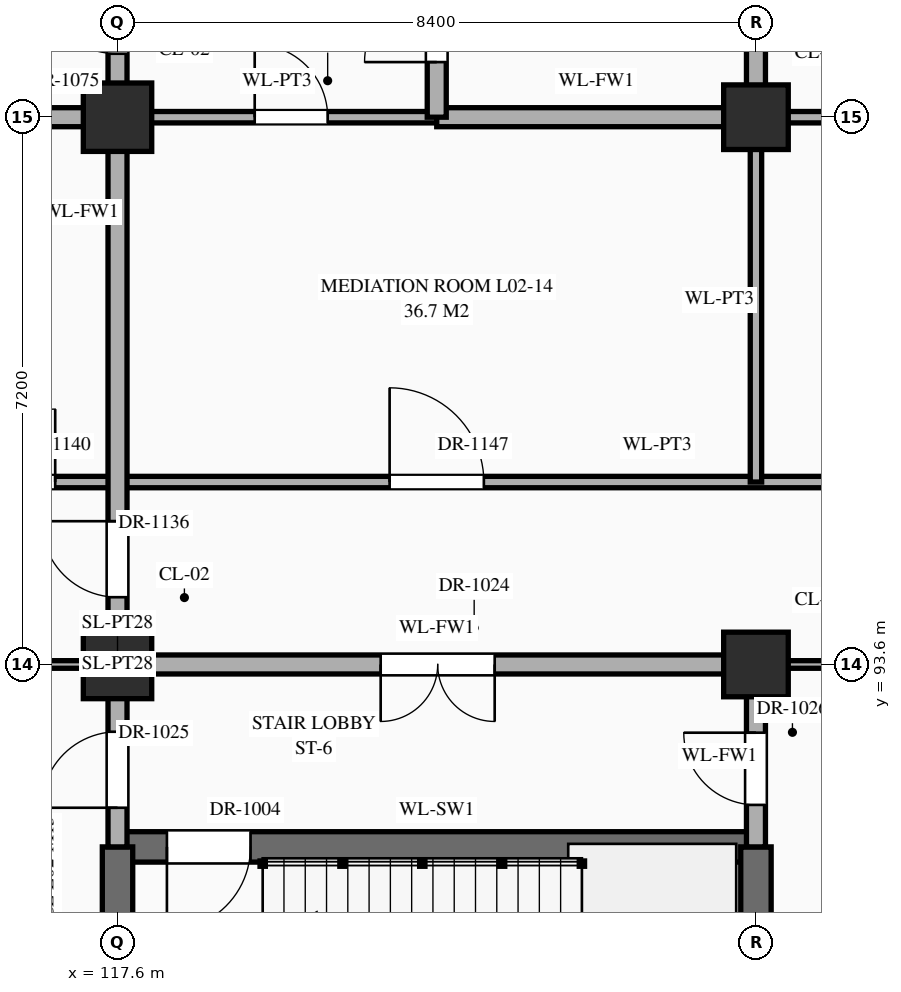
"""IFC4 building model, lengths in metres.
Left out: names, types, materials, properties, quantities, classifications, styles, units other than length and angle.
Written with IfcOpenShell. Run it as: python <this file> out.ifc"""

import sys

from ifc_helpers import new_model, si_unit, direction, frame, frame_2d, origin, origin_2d, place, context, subcontext, project, spatial, rectangle, extrude, element, fill, save


model = new_model("IFC4")
c1 = context("Model", 3, precision=1e-05, world=origin(), true_north=direction((0.0, 1.0)))
c2 = subcontext(c1, "Body", "Model", "MODEL_VIEW")
j1 = project(units=[si_unit("LENGTHUNIT", "METRE"), si_unit("PLANEANGLEUNIT", "RADIAN")], contexts=[c1])
p1 = place(None, origin())
s1 = spatial("IfcSite", under=j1, at=p1, CompositionType="ELEMENT")
p2 = place(p1, origin())
s2 = spatial("IfcBuilding", under=s1, at=p2, CompositionType="ELEMENT")
p3 = place(p2, frame((0.0, 0.0, 5.4)))
s3 = spatial("IfcBuildingStorey", under=s2, at=p3, CompositionType="ELEMENT", Elevation=5.4)
for number, where, z_axis, x_axis in (
    (1, (117.6, 93.6, 0.0), (0.0, 0.0, 1.0), (1.0, 0.0, 0.0)),
    (2, (117.6, 100.8, 0.0), (0.0, 0.0, 1.0), (1.0, 0.0, 0.0)),
):
    element("IfcColumn", number, at=place(p3, frame(where, z_axis=z_axis, x_axis=x_axis)), inside=s3, PredefinedType="COLUMN", context=c2, shape_type="SweptSolid", body=[
        extrude(rectangle(XDim=0.9, YDim=0.9, at=origin_2d()), origin(), (0.0, 0.0, 1.0), 5.4),
    ])
for number, where, z_axis, x_axis in (
    (3, (126.0, 93.6, 0.0), (0.0, 0.0, 1.0), (1.0, 0.0, 0.0)),
    (4, (126.0, 100.8, 0.0), (0.0, 0.0, 1.0), (1.0, 0.0, 0.0)),
):
    element("IfcColumn", number, at=place(p3, frame(where, z_axis=z_axis, x_axis=x_axis)), inside=s3, PredefinedType="COLUMN", context=c2, shape_type="SweptSolid", body=[
        extrude(rectangle(XDim=0.85, YDim=0.85, at=origin_2d()), origin(), (0.0, 0.0, 1.0), 5.4),
    ])
p4 = place(p3, frame((117.6, 91.2, 0.0), z_axis=(0.0, 0.0, 1.0), x_axis=(1.0, 0.0, 0.0)))
e5 = element("IfcWall", 5, at=p4, inside=s3, PredefinedType="SHEAR", context=c2, shape_type="SweptSolid", body=[
    extrude(rectangle(XDim=8.4, YDim=0.4, at=frame_2d((4.2, 0.0))), origin(), (0.0, 0.0, 1.0), 5.12),
])
p5 = place(p4, frame((0.65, 0.0, 0.0)))
e6 = element("IfcOpeningElement", 6, at=p5, cuts=e5, PredefinedType="OPENING", context=c2, shape_type="SweptSolid", body=[
    extrude(rectangle(XDim=1.1, YDim=2.2, at=frame_2d((0.55, 1.1))), frame((0.0, 0.212, 0.0), z_axis=(0.0, -1.0, 0.0), x_axis=(1.0, 0.0, 0.0)), (0.0, 0.0, 1.0), 0.424),
])
p6 = place(p3, frame((109.2, 93.6, 0.0), z_axis=(0.0, 0.0, 1.0), x_axis=(1.0, 0.0, 0.0)))
e7 = element("IfcWall", 7, at=p6, inside=s3, PredefinedType="STANDARD", context=c2, shape_type="SweptSolid", body=[
    extrude(rectangle(XDim=8.4, YDim=0.1, at=frame_2d((4.2, 0.0))), origin(), (0.0, 0.0, 1.0), 4.27),
])
p7 = place(p6, frame((1.025, 0.0, 0.0)))
e8 = element("IfcOpeningElement", 8, at=p7, cuts=e7, PredefinedType="OPENING", context=c2, shape_type="SweptSolid", body=[
    extrude(rectangle(XDim=1.12, YDim=2.25, at=frame_2d((0.56, 1.125))), frame((0.0, 0.062, 0.0), z_axis=(0.0, -1.0, 0.0), x_axis=(1.0, 0.0, 0.0)), (0.0, 0.0, 1.0), 0.124),
])
p8 = place(p6, frame((3.62, 0.0, 0.0)))
e9 = element("IfcOpeningElement", 9, at=p8, cuts=e7, PredefinedType="OPENING", context=c2, shape_type="SweptSolid", body=[
    extrude(rectangle(XDim=1.16, YDim=2.3, at=frame_2d((0.58, 1.15))), frame((0.0, 0.062, 0.0), z_axis=(0.0, -1.0, 0.0), x_axis=(1.0, 0.0, 0.0)), (0.0, 0.0, 1.0), 0.124),
])
p9 = place(p6, frame((6.215, 0.0, 0.0)))
e10 = element("IfcOpeningElement", 10, at=p9, cuts=e7, PredefinedType="OPENING", context=c2, shape_type="SweptSolid", body=[
    extrude(rectangle(XDim=1.2, YDim=2.35, at=frame_2d((0.6, 1.175))), frame((0.0, 0.062, 0.0), z_axis=(0.0, -1.0, 0.0), x_axis=(1.0, 0.0, 0.0)), (0.0, 0.0, 1.0), 0.124),
])
p10 = place(p3, frame((117.6, 93.6, 0.0), z_axis=(0.0, 0.0, 1.0), x_axis=(1.0, 0.0, 0.0)))
e11 = element("IfcWall", 11, at=p10, inside=s3, PredefinedType="STANDARD", context=c2, shape_type="SweptSolid", body=[
    extrude(rectangle(XDim=8.4, YDim=0.25, at=frame_2d((4.2, 0.0))), origin(), (0.0, 0.0, 1.0), 4.27),
])
p11 = place(p10, frame((3.462, 0.0, 0.0)))
e12 = element("IfcOpeningElement", 12, at=p11, cuts=e11, PredefinedType="OPENING", context=c2, shape_type="SweptSolid", body=[
    extrude(rectangle(XDim=1.5, YDim=2.25, at=frame_2d((0.75, 1.125))), frame((0.0, 0.137, 0.0), z_axis=(0.0, -1.0, 0.0), x_axis=(1.0, 0.0, 0.0)), (0.0, 0.0, 1.0), 0.274),
])
p12 = place(p3, frame((126.0, 93.6, 0.0), z_axis=(0.0, 0.0, 1.0), x_axis=(1.0, 0.0, 0.0)))
e13 = element("IfcWall", 13, at=p12, inside=s3, PredefinedType="STANDARD", context=c2, shape_type="SweptSolid", body=[
    extrude(rectangle(XDim=16.8, YDim=0.1, at=frame_2d((8.4, 0.0))), origin(), (0.0, 0.0, 1.0), 4.27),
])
p13 = place(p12, frame((3.72, 0.0, 0.0)))
e14 = element("IfcOpeningElement", 14, at=p13, cuts=e13, PredefinedType="OPENING", context=c2, shape_type="SweptSolid", body=[
    extrude(rectangle(XDim=0.96, YDim=2.2, at=frame_2d((0.48, 1.1))), frame((0.0, 0.062, 0.0), z_axis=(0.0, -1.0, 0.0), x_axis=(1.0, 0.0, 0.0)), (0.0, 0.0, 1.0), 0.124),
])
p14 = place(p12, frame((9.472, 0.0, 0.0)))
e15 = element("IfcOpeningElement", 15, at=p14, cuts=e13, PredefinedType="OPENING", context=c2, shape_type="SweptSolid", body=[
    extrude(rectangle(XDim=1.0, YDim=2.25, at=frame_2d((0.5, 1.125))), frame((0.0, 0.062, 0.0), z_axis=(0.0, -1.0, 0.0), x_axis=(1.0, 0.0, 0.0)), (0.0, 0.0, 1.0), 0.124),
])
p15 = place(p12, frame((11.75, 0.0, 0.0)))
e16 = element("IfcOpeningElement", 16, at=p15, cuts=e13, PredefinedType="OPENING", context=c2, shape_type="SweptSolid", body=[
    extrude(rectangle(XDim=1.7, YDim=2.45, at=frame_2d((0.85, 1.225))), frame((0.0, 0.062, 0.0), z_axis=(0.0, -1.0, 0.0), x_axis=(1.0, 0.0, 0.0)), (0.0, 0.0, 1.0), 0.124),
])
p16 = place(p12, frame((14.688, 0.0, 0.0)))
e17 = element("IfcOpeningElement", 17, at=p16, cuts=e13, PredefinedType="OPENING", context=c2, shape_type="SweptSolid", body=[
    extrude(rectangle(XDim=1.08, YDim=2.25, at=frame_2d((0.54, 1.125))), frame((0.0, 0.062, 0.0), z_axis=(0.0, -1.0, 0.0), x_axis=(1.0, 0.0, 0.0)), (0.0, 0.0, 1.0), 0.124),
])
p17 = place(p3, frame((115.0, 96.0, 0.0), z_axis=(0.0, 0.0, 1.0), x_axis=(1.0, 0.0, 0.0)))
e18 = element("IfcWall", 18, at=p17, inside=s3, PredefinedType="STANDARD", context=c2, shape_type="SweptSolid", body=[
    extrude(rectangle(XDim=19.4, YDim=0.15, at=frame_2d((9.7, 0.0))), origin(), (0.0, 0.0, 1.0), 5.12),
])
p18 = place(p17, frame((0.82, 0.0, 0.0)))
e19 = element("IfcOpeningElement", 19, at=p18, cuts=e18, PredefinedType="OPENING", context=c2, shape_type="SweptSolid", body=[
    extrude(rectangle(XDim=0.96, YDim=2.2, at=frame_2d((0.48, 1.1))), frame((0.0, 0.087, 0.0), z_axis=(0.0, -1.0, 0.0), x_axis=(1.0, 0.0, 0.0)), (0.0, 0.0, 1.0), 0.174),
])
p19 = place(p17, frame((6.18, 0.0, 0.0)))
e20 = element("IfcOpeningElement", 20, at=p19, cuts=e18, PredefinedType="OPENING", context=c2, shape_type="SweptSolid", body=[
    extrude(rectangle(XDim=1.24, YDim=2.3, at=frame_2d((0.62, 1.15))), frame((0.0, 0.087, 0.0), z_axis=(0.0, -1.0, 0.0), x_axis=(1.0, 0.0, 0.0)), (0.0, 0.0, 1.0), 0.174),
])
p20 = place(p17, frame((14.56, 0.0, 0.0)))
e21 = element("IfcOpeningElement", 21, at=p20, cuts=e18, PredefinedType="OPENING", context=c2, shape_type="SweptSolid", body=[
    extrude(rectangle(XDim=1.28, YDim=2.35, at=frame_2d((0.64, 1.175))), frame((0.0, 0.087, 0.0), z_axis=(0.0, -1.0, 0.0), x_axis=(1.0, 0.0, 0.0)), (0.0, 0.0, 1.0), 0.174),
])
p21 = place(p3, frame((113.4, 100.8, 0.0), z_axis=(0.0, 0.0, 1.0), x_axis=(1.0, 0.0, 0.0)))
e22 = element("IfcWall", 22, at=p21, inside=s3, PredefinedType="STANDARD", context=c2, shape_type="SweptSolid", body=[
    extrude(rectangle(XDim=4.2, YDim=0.25, at=frame_2d((2.1, 0.0))), origin(), (0.0, 0.0, 1.0), 4.27),
])
p22 = place(p21, frame((0.325, 0.0, 0.0)))
e23 = element("IfcOpeningElement", 23, at=p22, cuts=e22, PredefinedType="OPENING", context=c2, shape_type="SweptSolid", body=[
    extrude(rectangle(XDim=0.95, YDim=2.15, at=frame_2d((0.475, 1.075))), frame((0.0, 0.137, 0.0), z_axis=(0.0, -1.0, 0.0), x_axis=(1.0, 0.0, 0.0)), (0.0, 0.0, 1.0), 0.274),
])
p23 = place(p21, frame((2.165, 0.0, 0.0)))
e24 = element("IfcOpeningElement", 24, at=p23, cuts=e22, PredefinedType="OPENING", context=c2, shape_type="SweptSolid", body=[
    extrude(rectangle(XDim=1.1, YDim=2.2, at=frame_2d((0.55, 1.1))), frame((0.0, 0.137, 0.0), z_axis=(0.0, -1.0, 0.0), x_axis=(1.0, 0.0, 0.0)), (0.0, 0.0, 1.0), 0.274),
])
p24 = place(p3, frame((117.6, 100.8, 0.0), z_axis=(0.0, 0.0, 1.0), x_axis=(1.0, 0.0, 0.0)))
e25 = element("IfcWall", 25, at=p24, inside=s3, PredefinedType="STANDARD", context=c2, shape_type="SweptSolid", body=[
    extrude(rectangle(XDim=4.2, YDim=0.15, at=frame_2d((2.1, 0.0))), origin(), (0.0, 0.0, 1.0), 4.27),
])
p25 = place(p24, frame((1.805, 0.0, 0.0)))
e26 = element("IfcOpeningElement", 26, at=p25, cuts=e25, PredefinedType="OPENING", context=c2, shape_type="SweptSolid", body=[
    extrude(rectangle(XDim=0.96, YDim=2.2, at=frame_2d((0.48, 1.1))), frame((0.0, 0.087, 0.0), z_axis=(0.0, -1.0, 0.0), x_axis=(1.0, 0.0, 0.0)), (0.0, 0.0, 1.0), 0.174),
])
p26 = place(p3, frame((121.8, 100.8, 0.0), z_axis=(0.0, 0.0, 1.0), x_axis=(1.0, 0.0, 0.0)))
e27 = element("IfcWall", 27, at=p26, inside=s3, PredefinedType="STANDARD", context=c2, shape_type="SweptSolid", body=[
    extrude(rectangle(XDim=4.2, YDim=0.25, at=frame_2d((2.1, 0.0))), origin(), (0.0, 0.0, 1.0), 4.27),
])
p27 = place(p3, frame((126.0, 100.8, 0.0), z_axis=(0.0, 0.0, 1.0), x_axis=(1.0, 0.0, 0.0)))
e28 = element("IfcWall", 28, at=p27, inside=s3, PredefinedType="STANDARD", context=c2, shape_type="SweptSolid", body=[
    extrude(rectangle(XDim=8.4, YDim=0.15, at=frame_2d((4.2, 0.0))), origin(), (0.0, 0.0, 1.0), 4.27),
])
p28 = place(p27, frame((3.6, 0.0, 0.0)))
e29 = element("IfcOpeningElement", 29, at=p28, cuts=e28, PredefinedType="OPENING", context=c2, shape_type="SweptSolid", body=[
    extrude(rectangle(XDim=1.2, YDim=2.35, at=frame_2d((0.6, 1.175))), frame((0.0, 0.087, 0.0), z_axis=(0.0, -1.0, 0.0), x_axis=(1.0, 0.0, 0.0)), (0.0, 0.0, 1.0), 0.174),
])
p29 = place(p3, frame((117.6, 86.4, 0.0), z_axis=(0.0, 0.0, 1.0), x_axis=(0.0, 1.0, 0.0)))
e30 = element("IfcWall", 30, at=p29, inside=s3, PredefinedType="SHEAR", context=c2, shape_type="SweptSolid", body=[
    extrude(rectangle(XDim=4.8, YDim=0.4, at=frame_2d((2.4, 0.0))), origin(), (0.0, 0.0, 1.0), 5.12),
])
p30 = place(p3, frame((117.6, 91.2, 0.0), z_axis=(0.0, 0.0, 1.0), x_axis=(0.0, 1.0, 0.0)))
e31 = element("IfcWall", 31, at=p30, inside=s3, PredefinedType="STANDARD", context=c2, shape_type="SweptSolid", body=[
    extrude(rectangle(XDim=13.2, YDim=0.25, at=frame_2d((6.6, 0.0))), origin(), (0.0, 0.0, 1.0), 4.37),
])
p31 = place(p30, frame((0.515, 0.0, 0.0)))
e32 = element("IfcOpeningElement", 32, at=p31, cuts=e31, PredefinedType="OPENING", context=c2, shape_type="SweptSolid", body=[
    extrude(rectangle(XDim=1.0, YDim=2.2, at=frame_2d((0.5, 1.1))), frame((0.0, 0.137, 0.0), z_axis=(0.0, -1.0, 0.0), x_axis=(1.0, 0.0, 0.0)), (0.0, 0.0, 1.0), 0.274),
])
p32 = place(p30, frame((10.435, 0.0, 0.0)))
e33 = element("IfcOpeningElement", 33, at=p32, cuts=e31, PredefinedType="OPENING", context=c2, shape_type="SweptSolid", body=[
    extrude(rectangle(XDim=1.1, YDim=2.2, at=frame_2d((0.55, 1.1))), frame((0.0, 0.137, 0.0), z_axis=(0.0, -1.0, 0.0), x_axis=(1.0, 0.0, 0.0)), (0.0, 0.0, 1.0), 0.274),
])
p33 = place(p30, frame((3.285, 0.0, 0.0)))
e34 = element("IfcOpeningElement", 34, at=p33, cuts=e31, PredefinedType="OPENING", context=c2, shape_type="SweptSolid", body=[
    extrude(rectangle(XDim=1.0, YDim=2.2, at=frame_2d((0.5, 1.1))), frame((0.0, 0.137, 0.0), z_axis=(0.0, -1.0, 0.0), x_axis=(1.0, 0.0, 0.0)), (0.0, 0.0, 1.0), 0.274),
])
p34 = place(p3, frame((121.8, 100.8, 0.0), z_axis=(0.0, 0.0, 1.0), x_axis=(0.0, 1.0, 0.0)))
e35 = element("IfcWall", 35, at=p34, inside=s3, PredefinedType="STANDARD", context=c2, shape_type="SweptSolid", body=[
    extrude(rectangle(XDim=3.6, YDim=0.25, at=frame_2d((1.8, 0.0))), origin(), (0.0, 0.0, 1.0), 4.72),
])
p35 = place(p34, frame((0.725, 0.0, 0.0)))
e36 = element("IfcOpeningElement", 36, at=p35, cuts=e35, PredefinedType="OPENING", context=c2, shape_type="SweptSolid", body=[
    extrude(rectangle(XDim=0.95, YDim=2.15, at=frame_2d((0.475, 1.075))), frame((0.0, 0.137, 0.0), z_axis=(0.0, -1.0, 0.0), x_axis=(1.0, 0.0, 0.0)), (0.0, 0.0, 1.0), 0.274),
])
p36 = place(p3, frame((126.0, 86.4, 0.0), z_axis=(0.0, 0.0, 1.0), x_axis=(0.0, 1.0, 0.0)))
e37 = element("IfcWall", 37, at=p36, inside=s3, PredefinedType="SHEAR", context=c2, shape_type="SweptSolid", body=[
    extrude(rectangle(XDim=4.8, YDim=0.4, at=frame_2d((2.4, 0.0))), origin(), (0.0, 0.0, 1.0), 5.12),
])
p37 = place(p3, frame((126.0, 91.2, 0.0), z_axis=(0.0, 0.0, 1.0), x_axis=(0.0, 1.0, 0.0)))
e38 = element("IfcWall", 38, at=p37, inside=s3, PredefinedType="STANDARD", context=c2, shape_type="SweptSolid", body=[
    extrude(rectangle(XDim=2.4, YDim=0.25, at=frame_2d((1.2, 0.0))), origin(), (0.0, 0.0, 1.0), 4.37),
])
p38 = place(p37, frame((0.552, 0.0, 0.0)))
e39 = element("IfcOpeningElement", 39, at=p38, cuts=e38, PredefinedType="OPENING", context=c2, shape_type="SweptSolid", body=[
    extrude(rectangle(XDim=0.95, YDim=2.15, at=frame_2d((0.475, 1.075))), frame((0.0, 0.137, 0.0), z_axis=(0.0, -1.0, 0.0), x_axis=(1.0, 0.0, 0.0)), (0.0, 0.0, 1.0), 0.274),
])
p39 = place(p3, frame((126.0, 96.0, 0.0), z_axis=(0.0, 0.0, 1.0), x_axis=(0.0, 1.0, 0.0)))
e40 = element("IfcWall", 40, at=p39, inside=s3, PredefinedType="STANDARD", context=c2, shape_type="SweptSolid", body=[
    extrude(rectangle(XDim=4.8, YDim=0.15, at=frame_2d((2.4, 0.0))), origin(), (0.0, 0.0, 1.0), 4.37),
])
p40 = place(p3, frame((126.0, 100.8, 0.0), z_axis=(0.0, 0.0, 1.0), x_axis=(0.0, 1.0, 0.0)))
e41 = element("IfcWall", 41, at=p40, inside=s3, PredefinedType="STANDARD", context=c2, shape_type="SweptSolid", body=[
    extrude(rectangle(XDim=3.6, YDim=0.25, at=frame_2d((1.8, 0.0))), origin(), (0.0, 0.0, 1.0), 4.37),
])
p41 = place(p40, frame((0.897, 0.0, 0.0)))
e42 = element("IfcOpeningElement", 42, at=p41, cuts=e41, PredefinedType="OPENING", context=c2, shape_type="SweptSolid", body=[
    extrude(rectangle(XDim=0.95, YDim=2.15, at=frame_2d((0.475, 1.075))), frame((0.0, 0.137, 0.0), z_axis=(0.0, -1.0, 0.0), x_axis=(1.0, 0.0, 0.0)), (0.0, 0.0, 1.0), 0.274),
])
p42 = place(p5, frame((1.1, 0.0, 0.0), z_axis=(0.0, 0.0, 1.0), x_axis=(-1.0, 0.0, 0.0)))
e43 = element("IfcDoor", 43, at=p42, inside=s3, OperationType="SINGLE_SWING_RIGHT", PredefinedType="DOOR", context=c2, shape_type="SweptSolid", body=[
    extrude(rectangle(XDim=1.1, YDim=2.2, at=frame_2d((0.55, 1.1))), frame((0.0, 0.025, 0.0), z_axis=(0.0, -1.0, 0.0), x_axis=(1.0, 0.0, 0.0)), (0.0, 0.0, 1.0), 0.05),
])
fill(e6, e43)
p43 = place(p11, frame((1.5, 0.0, 0.0), z_axis=(0.0, 0.0, 1.0), x_axis=(-1.0, 0.0, 0.0)))
e44 = element("IfcDoor", 44, at=p43, inside=s3, OperationType="DOUBLE_DOOR_SINGLE_SWING", PredefinedType="DOOR", context=c2, shape_type="SweptSolid", body=[
    extrude(rectangle(XDim=1.5, YDim=2.25, at=frame_2d((0.75, 1.125))), frame((0.0, 0.025, 0.0), z_axis=(0.0, -1.0, 0.0), x_axis=(1.0, 0.0, 0.0)), (0.0, 0.0, 1.0), 0.05),
])
fill(e12, e44)
p44 = place(p31, origin())
e45 = element("IfcDoor", 45, at=p44, inside=s3, OperationType="SINGLE_SWING_LEFT", PredefinedType="DOOR", context=c2, shape_type="SweptSolid", body=[
    extrude(rectangle(XDim=1.0, YDim=2.2, at=frame_2d((0.5, 1.1))), frame((0.0, 0.025, 0.0), z_axis=(0.0, -1.0, 0.0), x_axis=(1.0, 0.0, 0.0)), (0.0, 0.0, 1.0), 0.05),
])
fill(e32, e45)
p45 = place(p38, origin())
e46 = element("IfcDoor", 46, at=p45, inside=s3, OperationType="SINGLE_SWING_RIGHT", PredefinedType="DOOR", context=c2, shape_type="SweptSolid", body=[
    extrude(rectangle(XDim=0.95, YDim=2.15, at=frame_2d((0.475, 1.075))), frame((0.0, 0.025, 0.0), z_axis=(0.0, -1.0, 0.0), x_axis=(1.0, 0.0, 0.0)), (0.0, 0.0, 1.0), 0.05),
])
fill(e39, e46)
p46 = place(p35, origin())
e47 = element("IfcDoor", 47, at=p46, inside=s3, OperationType="SINGLE_SWING_LEFT", PredefinedType="DOOR", context=c2, shape_type="SweptSolid", body=[
    extrude(rectangle(XDim=0.95, YDim=2.15, at=frame_2d((0.475, 1.075))), frame((0.0, 0.025, 0.0), z_axis=(0.0, -1.0, 0.0), x_axis=(1.0, 0.0, 0.0)), (0.0, 0.0, 1.0), 0.05),
])
fill(e36, e47)
p47 = place(p32, origin())
e48 = element("IfcDoor", 48, at=p47, inside=s3, OperationType="SINGLE_SWING_RIGHT", PredefinedType="DOOR", context=c2, shape_type="SweptSolid", body=[
    extrude(rectangle(XDim=1.1, YDim=2.2, at=frame_2d((0.55, 1.1))), frame((0.0, 0.025, 0.0), z_axis=(0.0, -1.0, 0.0), x_axis=(1.0, 0.0, 0.0)), (0.0, 0.0, 1.0), 0.05),
])
fill(e33, e48)
p48 = place(p25, origin())
e49 = element("IfcDoor", 49, at=p48, inside=s3, OperationType="SINGLE_SWING_LEFT", PredefinedType="DOOR", context=c2, shape_type="SweptSolid", body=[
    extrude(rectangle(XDim=0.96, YDim=2.2, at=frame_2d((0.48, 1.1))), frame((0.0, 0.025, 0.0), z_axis=(0.0, -1.0, 0.0), x_axis=(1.0, 0.0, 0.0)), (0.0, 0.0, 1.0), 0.05),
])
fill(e26, e49)
p49 = place(p33, origin())
e50 = element("IfcDoor", 50, at=p49, inside=s3, OperationType="SINGLE_SWING_RIGHT", PredefinedType="DOOR", context=c2, shape_type="SweptSolid", body=[
    extrude(rectangle(XDim=1.0, YDim=2.2, at=frame_2d((0.5, 1.1))), frame((0.0, 0.025, 0.0), z_axis=(0.0, -1.0, 0.0), x_axis=(1.0, 0.0, 0.0)), (0.0, 0.0, 1.0), 0.05),
])
fill(e34, e50)
p50 = place(p18, origin())
e51 = element("IfcDoor", 51, at=p50, inside=s3, OperationType="SINGLE_SWING_RIGHT", PredefinedType="DOOR", context=c2, shape_type="SweptSolid", body=[
    extrude(rectangle(XDim=0.96, YDim=2.2, at=frame_2d((0.48, 1.1))), frame((0.0, 0.025, 0.0), z_axis=(0.0, -1.0, 0.0), x_axis=(1.0, 0.0, 0.0)), (0.0, 0.0, 1.0), 0.05),
])
fill(e19, e51)
p51 = place(p19, origin())
e52 = element("IfcDoor", 52, at=p51, inside=s3, OperationType="SINGLE_SWING_LEFT", PredefinedType="DOOR", context=c2, shape_type="SweptSolid", body=[
    extrude(rectangle(XDim=1.24, YDim=2.3, at=frame_2d((0.62, 1.15))), frame((0.0, 0.025, 0.0), z_axis=(0.0, -1.0, 0.0), x_axis=(1.0, 0.0, 0.0)), (0.0, 0.0, 1.0), 0.05),
])
fill(e20, e52)
save(model, sys.argv[1])
